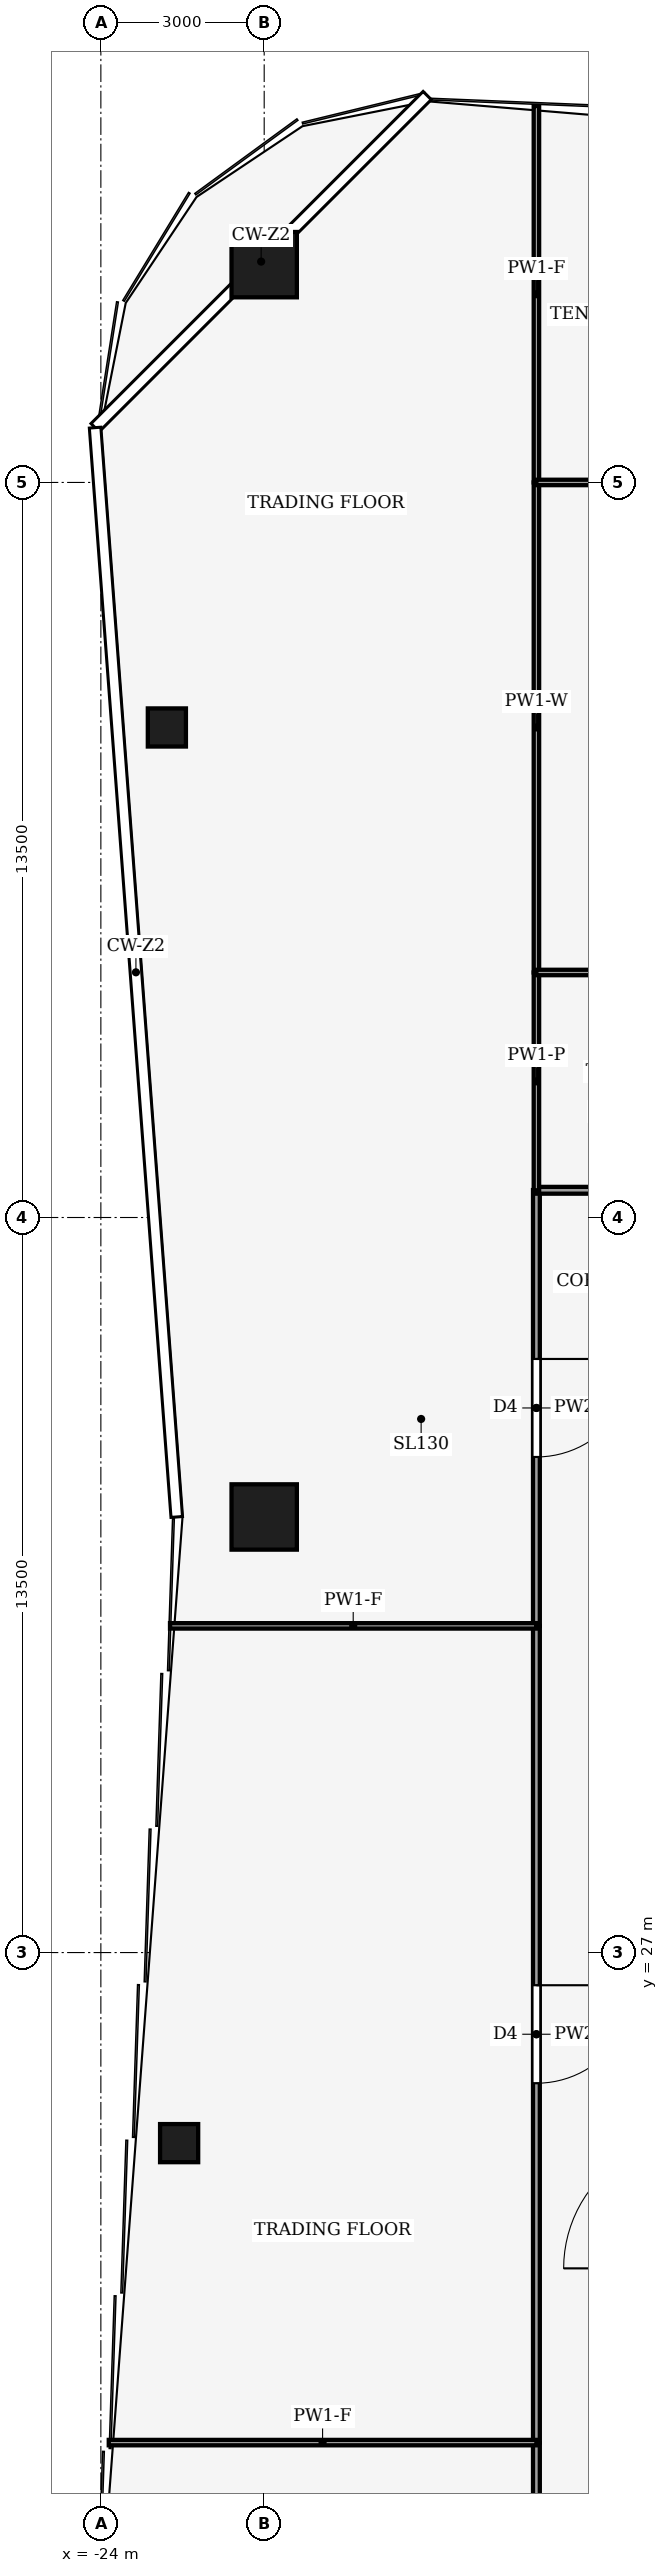
"""IFC4 building model, lengths in metres.
Left out: names, types, materials, properties, quantities, classifications, styles, units other than length and angle.
Written with IfcOpenShell. Run it as: python <this file> out.ifc"""

import sys

from ifc_helpers import new_model, si_unit, direction, frame, frame_2d, origin, origin_2d, place, context, subcontext, project, spatial, rectangle, hollow_rectangle, extrude, element, fill, save


model = new_model("IFC4")
c1 = context("Model", 3, precision=1e-05, world=origin(), true_north=direction((0.0, 1.0)))
c2 = subcontext(c1, "Body", "Model", "MODEL_VIEW")
j1 = project(units=[si_unit("LENGTHUNIT", "METRE"), si_unit("PLANEANGLEUNIT", "RADIAN")], contexts=[c1])
p1 = place(None, origin())
s1 = spatial("IfcSite", under=j1, at=p1, CompositionType="ELEMENT")
p2 = place(p1, origin())
s2 = spatial("IfcBuilding", under=s1, at=p2, CompositionType="ELEMENT")
p3 = place(p2, frame((0.0, 0.0, 146.0)))
s3 = spatial("IfcBuildingStorey", under=s2, at=p3, CompositionType="ELEMENT", Elevation=146.0)
for number, where, z_axis, x_axis in (
    (1, (-21.0, 58.0, 0.0), (0.0, 0.0, 1.0), (1.0, 0.0, 0.0)),
    (2, (-21.0, 35.0, 0.0), (0.0, 0.0, 1.0), (1.0, 0.0, 0.0)),
):
    element("IfcColumn", number, at=place(p3, frame(where, z_axis=z_axis, x_axis=x_axis)), inside=s3, PredefinedType="COLUMN", context=c2, shape_type="SweptSolid", body=[
        extrude(hollow_rectangle(XDim=1.2, YDim=1.2, WallThickness=0.07, at=origin_2d()), origin(), (0.0, 0.0, 1.0), 4.0),
    ])
for number, where, z_axis, x_axis in (
    (3, (-22.562, 23.5, 0.0), (0.0, 0.0, 1.0), (1.0, 0.0, 0.0)),
    (4, (-22.788, 49.5, 0.0), (0.0, 0.0, 1.0), (1.0, 0.0, 0.0)),
):
    element("IfcColumn", number, at=place(p3, frame(where, z_axis=z_axis, x_axis=x_axis)), inside=s3, PredefinedType="COLUMN", context=c2, shape_type="SweptSolid", body=[
        extrude(hollow_rectangle(XDim=0.7, YDim=0.7, WallThickness=0.03, at=origin_2d()), origin(), (0.0, 0.0, 1.0), 4.0),
    ])
p4 = place(p3, frame((-16.0, 9.087, 0.0), z_axis=(0.0, 0.0, 1.0), x_axis=(0.0, 1.0, 0.0)))
e5 = element("IfcWall", 5, at=p4, inside=s3, PredefinedType="PARTITIONING", context=c2, shape_type="SweptSolid", body=[
    extrude(rectangle(XDim=8.913, YDim=0.125, at=frame_2d((4.457, 0.0))), origin(), (0.0, 0.0, 1.0), 3.04),
])
p5 = place(p4, frame((4.022, 0.0, 0.0)))
e6 = element("IfcOpeningElement", 6, at=p5, cuts=e5, PredefinedType="OPENING", context=c2, shape_type="SweptSolid", body=[
    extrude(rectangle(XDim=1.0, YDim=2.1, at=frame_2d((0.5, 1.05))), frame((0.0, 0.073, 0.0), z_axis=(0.0, -1.0, 0.0), x_axis=(1.0, 0.0, 0.0)), (0.0, 0.0, 1.0), 0.145),
])
p6 = place(p3, frame((-16.0, 33.0, 0.0), z_axis=(0.0, 0.0, 1.0), x_axis=(0.0, -1.0, 0.0)))
e7 = element("IfcWall", 7, at=p6, inside=s3, PredefinedType="PARTITIONING", context=c2, shape_type="SweptSolid", body=[
    extrude(rectangle(XDim=15.0, YDim=0.125, at=frame_2d((7.5, 0.0))), origin(), (0.0, 0.0, 1.0), 3.48),
])
p7 = place(p6, frame((6.6, 0.0, 0.0)))
e8 = element("IfcOpeningElement", 8, at=p7, cuts=e7, PredefinedType="OPENING", context=c2, shape_type="SweptSolid", body=[
    extrude(rectangle(XDim=1.8, YDim=2.1, at=frame_2d((0.9, 1.05))), frame((0.0, 0.073, 0.0), z_axis=(0.0, -1.0, 0.0), x_axis=(1.0, 0.0, 0.0)), (0.0, 0.0, 1.0), 0.145),
])
p8 = place(p3, frame((-16.0, 41.004, 0.0), z_axis=(0.0, 0.0, 1.0), x_axis=(0.0, -1.0, 0.0)))
e9 = element("IfcWall", 9, at=p8, inside=s3, PredefinedType="PARTITIONING", context=c2, shape_type="SweptSolid", body=[
    extrude(rectangle(XDim=8.004, YDim=0.125, at=frame_2d((4.002, 0.0))), origin(), (0.0, 0.0, 1.0), 3.14),
])
p9 = place(p8, frame((3.102, 0.0, 0.0)))
e10 = element("IfcOpeningElement", 10, at=p9, cuts=e9, PredefinedType="OPENING", context=c2, shape_type="SweptSolid", body=[
    extrude(rectangle(XDim=1.8, YDim=2.1, at=frame_2d((0.9, 1.05))), frame((0.0, 0.073, 0.0), z_axis=(0.0, -1.0, 0.0), x_axis=(1.0, 0.0, 0.0)), (0.0, 0.0, 1.0), 0.145),
])
p10 = place(p3, frame((-16.0, 41.0, 0.0), z_axis=(0.0, 0.0, 1.0), x_axis=(1.0, 0.0, 0.0)))
e11 = element("IfcWall", 11, at=p10, inside=s3, PredefinedType="PARTITIONING", context=c2, shape_type="SweptSolid", body=[
    extrude(rectangle(XDim=4.0, YDim=0.125, at=frame_2d((2.0, 0.0))), origin(), (0.0, 0.0, 1.0), 3.44),
])
p11 = place(p10, frame((1.5, 0.0, 0.0)))
e12 = element("IfcOpeningElement", 12, at=p11, cuts=e11, PredefinedType="OPENING", context=c2, shape_type="SweptSolid", body=[
    extrude(rectangle(XDim=1.0, YDim=2.1, at=frame_2d((0.5, 1.05))), frame((0.0, 0.073, 0.0), z_axis=(0.0, -1.0, 0.0), x_axis=(1.0, 0.0, 0.0)), (0.0, 0.0, 1.0), 0.145),
])
p12 = place(p3, frame((-16.0, 18.0, 0.0), z_axis=(0.0, 0.0, 1.0), x_axis=(-1.0, 0.0, 0.0)))
e13 = element("IfcWall", 13, at=p12, inside=s3, PredefinedType="PARTITIONING", context=c2, shape_type="SweptSolid", body=[
    extrude(rectangle(XDim=7.855, YDim=0.1, at=frame_2d((3.927, 0.0))), origin(), (0.0, 0.0, 1.0), 3.04),
])
p13 = place(p3, frame((-16.0, 33.0, 0.0), z_axis=(0.0, 0.0, 1.0), x_axis=(-1.0, 0.0, 0.0)))
e14 = element("IfcWall", 14, at=p13, inside=s3, PredefinedType="PARTITIONING", context=c2, shape_type="SweptSolid", body=[
    extrude(rectangle(XDim=6.73, YDim=0.1, at=frame_2d((3.365, 0.0))), origin(), (0.0, 0.0, 1.0), 3.04),
])
p14 = place(p3, frame((-16.0, 41.0, 0.0), z_axis=(0.0, 0.0, 1.0), x_axis=(0.0, 1.0, 0.0)))
e15 = element("IfcWall", 15, at=p14, inside=s3, PredefinedType="PARTITIONING", context=c2, shape_type="SweptSolid", body=[
    extrude(rectangle(XDim=4.0, YDim=0.1, at=frame_2d((2.0, 0.0))), origin(), (0.0, 0.0, 1.0), 3.44),
])
p15 = place(p3, frame((-16.0, 45.0, 0.0), z_axis=(0.0, 0.0, 1.0), x_axis=(0.0, 1.0, 0.0)))
e16 = element("IfcWall", 16, at=p15, inside=s3, PredefinedType="PARTITIONING", context=c2, shape_type="SweptSolid", body=[
    extrude(rectangle(XDim=9.0, YDim=0.1, at=frame_2d((4.5, 0.0))), origin(), (0.0, 0.0, 1.0), 3.24),
])
p16 = place(p3, frame((-16.0, 54.0, 0.0), z_axis=(0.0, 0.0, 1.0), x_axis=(0.0, 1.0, 0.0)))
e17 = element("IfcWall", 17, at=p16, inside=s3, PredefinedType="PARTITIONING", context=c2, shape_type="SweptSolid", body=[
    extrude(rectangle(XDim=6.913, YDim=0.1, at=frame_2d((3.457, 0.0))), origin(), (0.0, 0.0, 1.0), 3.04),
])
p17 = place(p3, frame((-11.996, 45.0, 0.0), z_axis=(0.0, 0.0, 1.0), x_axis=(-1.0, 0.0, 0.0)))
e18 = element("IfcWall", 18, at=p17, inside=s3, PredefinedType="PARTITIONING", context=c2, shape_type="SweptSolid", body=[
    extrude(rectangle(XDim=4.004, YDim=0.1, at=frame_2d((2.002, 0.0))), origin(), (0.0, 0.0, 1.0), 3.87),
])
p18 = place(p3, frame((-16.0, 54.0, 0.0), z_axis=(0.0, 0.0, 1.0), x_axis=(1.0, 0.0, 0.0)))
e19 = element("IfcWall", 19, at=p18, inside=s3, PredefinedType="PARTITIONING", context=c2, shape_type="SweptSolid", body=[
    extrude(rectangle(XDim=4.0, YDim=0.1, at=frame_2d((2.0, 0.0))), origin(), (0.0, 0.0, 1.0), 3.87),
])
p19 = place(p18, frame((1.5, 0.0, 0.0)))
e20 = element("IfcOpeningElement", 20, at=p19, cuts=e19, PredefinedType="OPENING", context=c2, shape_type="SweptSolid", body=[
    extrude(rectangle(XDim=1.0, YDim=2.1, at=frame_2d((0.5, 1.05))), frame((0.0, 0.06, 0.0), z_axis=(0.0, -1.0, 0.0), x_axis=(1.0, 0.0, 0.0)), (0.0, 0.0, 1.0), 0.12),
])
p20 = place(p7, origin())
e21 = element("IfcDoor", 21, at=p20, inside=s3, OperationType="DOUBLE_DOOR_SINGLE_SWING", PredefinedType="DOOR", context=c2, shape_type="SweptSolid", body=[
    extrude(rectangle(XDim=1.8, YDim=2.1, at=frame_2d((0.9, 1.05))), frame((0.0, 0.025, 0.0), z_axis=(0.0, -1.0, 0.0), x_axis=(1.0, 0.0, 0.0)), (0.0, 0.0, 1.0), 0.05),
])
fill(e8, e21)
p21 = place(p9, origin())
e22 = element("IfcDoor", 22, at=p21, inside=s3, OperationType="DOUBLE_DOOR_SINGLE_SWING", PredefinedType="DOOR", context=c2, shape_type="SweptSolid", body=[
    extrude(rectangle(XDim=1.8, YDim=2.1, at=frame_2d((0.9, 1.05))), frame((0.0, 0.025, 0.0), z_axis=(0.0, -1.0, 0.0), x_axis=(1.0, 0.0, 0.0)), (0.0, 0.0, 1.0), 0.05),
])
fill(e10, e22)
save(model, sys.argv[1])
